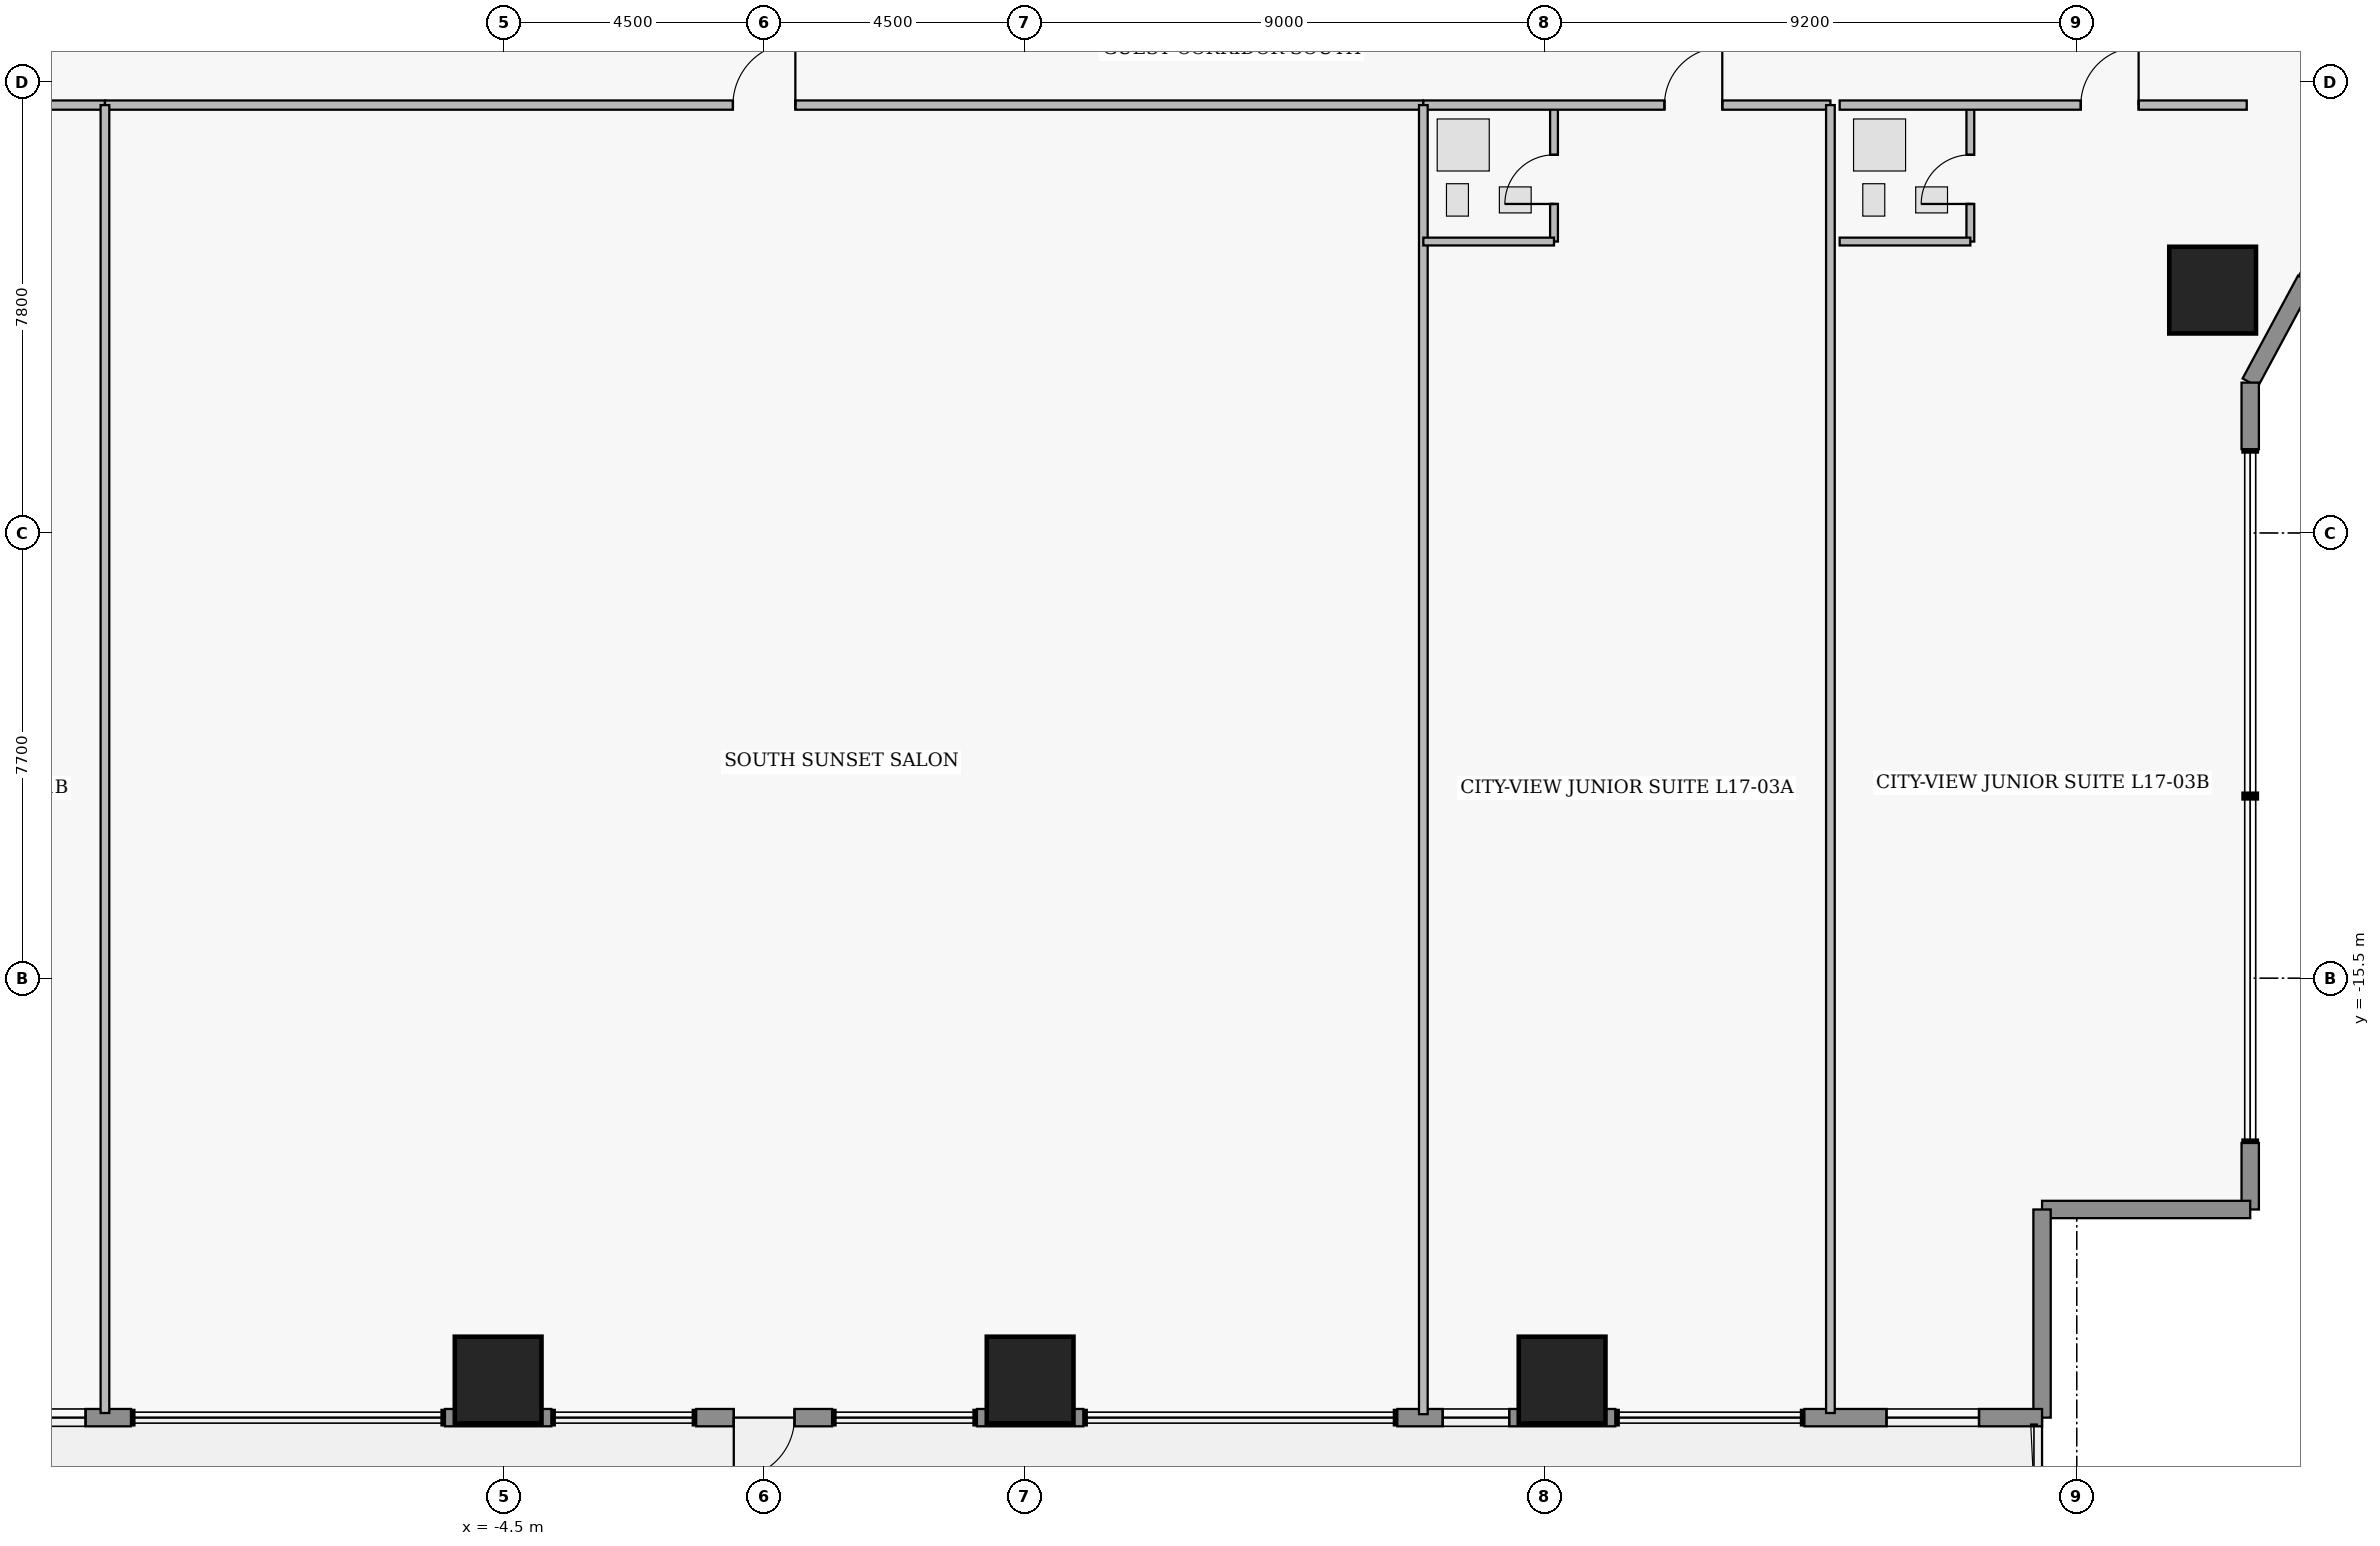
"""IFC4 building model, lengths in metres.
Left out: names, types, materials, properties, quantities, classifications, styles, units other than length and angle.
Written with IfcOpenShell. Run it as: python <this file> out.ifc"""

import sys

from ifc_helpers import new_model, si_unit, direction, frame, frame_2d, origin, origin_2d, place, context, subcontext, project, spatial, rectangle, extrude, element, fill, save


model = new_model("IFC4")
c1 = context("Model", 3, precision=1e-05, world=origin(), true_north=direction((0.0, 1.0)))
c2 = subcontext(c1, "Body", "Model", "MODEL_VIEW")
j1 = project(units=[si_unit("LENGTHUNIT", "METRE"), si_unit("PLANEANGLEUNIT", "RADIAN")], contexts=[c1])
p1 = place(None, origin())
s1 = spatial("IfcSite", under=j1, at=p1, CompositionType="ELEMENT")
p2 = place(p1, origin())
s2 = spatial("IfcBuilding", under=s1, at=p2, CompositionType="ELEMENT")
p3 = place(p2, frame((0.0, 0.0, 71.4)))
s3 = spatial("IfcBuildingStorey", under=s2, at=p3, CompositionType="ELEMENT", Elevation=71.4)
for number, where, z_axis, x_axis in (
    (1, (-4.6, -22.45, 0.0), (0.0, 0.0, 1.0), (1.0, 0.0, 0.0)),
    (2, (4.6, -22.45, 0.0), (0.0, 0.0, 1.0), (1.0, 0.0, 0.0)),
    (3, (13.8, -22.45, 0.0), (0.0, 0.0, 1.0), (1.0, 0.0, 0.0)),
    (4, (25.05, -3.6, 0.0), (0.0, 0.0, 1.0), (1.0, 0.0, 0.0)),
):
    element("IfcColumn", number, at=place(p3, frame(where, z_axis=z_axis, x_axis=x_axis)), inside=s3, PredefinedType="COLUMN", context=c2, shape_type="SweptSolid", body=[
        extrude(rectangle(XDim=1.5, YDim=1.5, at=origin_2d()), origin(), (0.0, 0.0, 1.0), 3.65),
    ])
p4 = place(p3, frame((25.7, 5.2, 0.0), z_axis=(0.0, 0.0, 1.0), x_axis=(0.474109683532, -0.880465790352, 0.0)))
e5 = element("IfcWall", 5, at=p4, inside=s3, PredefinedType="STANDARD", context=c2, shape_type="SweptSolid", body=[
    extrude(rectangle(XDim=5.906, YDim=0.3, at=frame_2d((2.953, 0.0))), origin(), (0.0, 0.0, 1.0), 3.43),
])
p5 = place(p4, frame((2.324, 0.0, 0.95)))
e6 = element("IfcOpeningElement", 6, at=p5, cuts=e5, PredefinedType="OPENING", context=c2, shape_type="SweptSolid", body=[
    extrude(rectangle(XDim=1.15, YDim=1.55, at=frame_2d((0.575, 0.775))), frame((0.0, 0.16, 0.0), z_axis=(0.0, -1.0, 0.0), x_axis=(1.0, 0.0, 0.0)), (0.0, 0.0, 1.0), 0.32),
])
p6 = place(p3, frame((26.658, -3.421, 0.0), z_axis=(0.0, 0.0, 1.0), x_axis=(-0.474121438562, -0.88045946045, 0.0)))
e7 = element("IfcWall", 7, at=p6, inside=s3, PredefinedType="STANDARD", context=c2, shape_type="SweptSolid", body=[
    extrude(rectangle(XDim=2.021, YDim=0.3, at=frame_2d((1.01, 0.0))), origin(), (0.0, 0.0, 1.0), 3.43),
])
p7 = place(p3, frame((25.7, -5.2, 0.0), z_axis=(0.0, 0.0, 1.0), x_axis=(0.0, -1.0, 0.0)))
e8 = element("IfcWall", 8, at=p7, inside=s3, PredefinedType="STANDARD", context=c2, shape_type="SweptSolid", body=[
    extrude(rectangle(XDim=1.15, YDim=0.3, at=frame_2d((0.575, 0.0))), origin(), (0.0, 0.0, 1.0), 3.43),
])
p8 = place(p3, frame((25.7, -18.35, 0.0), z_axis=(0.0, 0.0, 1.0), x_axis=(0.0, -1.0, 0.0)))
e9 = element("IfcWall", 9, at=p8, inside=s3, PredefinedType="STANDARD", context=c2, shape_type="SweptSolid", body=[
    extrude(rectangle(XDim=1.15, YDim=0.3, at=frame_2d((0.575, 0.0))), origin(), (0.0, 0.0, 1.0), 3.43),
])
p9 = place(p3, frame((25.7, -19.5, 0.0), z_axis=(0.0, 0.0, 1.0), x_axis=(-1.0, 0.0, 0.0)))
e10 = element("IfcWall", 10, at=p9, inside=s3, PredefinedType="STANDARD", context=c2, shape_type="SweptSolid", body=[
    extrude(rectangle(XDim=3.6, YDim=0.3, at=frame_2d((1.8, 0.0))), origin(), (0.0, 0.0, 1.0), 3.43),
])
p10 = place(p3, frame((22.1, -19.5, 0.0), z_axis=(0.0, 0.0, 1.0), x_axis=(0.0, -1.0, 0.0)))
e11 = element("IfcWall", 11, at=p10, inside=s3, PredefinedType="STANDARD", context=c2, shape_type="SweptSolid", body=[
    extrude(rectangle(XDim=3.6, YDim=0.3, at=frame_2d((1.8, 0.0))), origin(), (0.0, 0.0, 1.0), 3.43),
])
p11 = place(p3, frame((22.1, -23.1, 0.0), z_axis=(0.0, 0.0, 1.0), x_axis=(-1.0, 0.0, 0.0)))
e12 = element("IfcWall", 12, at=p11, inside=s3, PredefinedType="STANDARD", context=c2, shape_type="SweptSolid", body=[
    extrude(rectangle(XDim=4.11, YDim=0.3, at=frame_2d((2.055, 0.0))), origin(), (0.0, 0.0, 1.0), 3.43),
])
p12 = place(p11, frame((1.09, 0.0, 0.85)))
e13 = element("IfcOpeningElement", 13, at=p12, cuts=e12, PredefinedType="OPENING", context=c2, shape_type="SweptSolid", body=[
    extrude(rectangle(XDim=1.6, YDim=1.8, at=frame_2d((0.8, 0.9))), frame((0.0, 0.16, 0.0), z_axis=(0.0, -1.0, 0.0), x_axis=(1.0, 0.0, 0.0)), (0.0, 0.0, 1.0), 0.32),
])
p13 = place(p3, frame((14.72, -23.1, 0.0), z_axis=(0.0, 0.0, 1.0), x_axis=(-1.0, 0.0, 0.0)))
e14 = element("IfcWall", 14, at=p13, inside=s3, PredefinedType="STANDARD", context=c2, shape_type="SweptSolid", body=[
    extrude(rectangle(XDim=3.77, YDim=0.3, at=frame_2d((1.885, 0.0))), origin(), (0.0, 0.0, 1.0), 3.43),
])
p14 = place(p13, frame((1.835, 0.0, 0.95)))
e15 = element("IfcOpeningElement", 15, at=p14, cuts=e14, PredefinedType="OPENING", context=c2, shape_type="SweptSolid", body=[
    extrude(rectangle(XDim=1.15, YDim=1.55, at=frame_2d((0.575, 0.775))), frame((0.0, 0.16, 0.0), z_axis=(0.0, -1.0, 0.0), x_axis=(1.0, 0.0, 0.0)), (0.0, 0.0, 1.0), 0.32),
])
p15 = place(p3, frame((5.52, -23.1, 0.0), z_axis=(0.0, 0.0, 1.0), x_axis=(-1.0, 0.0, 0.0)))
e16 = element("IfcWall", 16, at=p15, inside=s3, PredefinedType="STANDARD", context=c2, shape_type="SweptSolid", body=[
    extrude(rectangle(XDim=1.84, YDim=0.3, at=frame_2d((0.92, 0.0))), origin(), (0.0, 0.0, 1.0), 3.43),
])
p16 = place(p3, frame((1.175, -23.1, 0.0), z_axis=(0.0, 0.0, 1.0), x_axis=(-1.0, 0.0, 0.0)))
e17 = element("IfcWall", 17, at=p16, inside=s3, PredefinedType="STANDARD", context=c2, shape_type="SweptSolid", body=[
    extrude(rectangle(XDim=2.35, YDim=0.3, at=frame_2d((1.175, 0.0))), origin(), (0.0, 0.0, 1.0), 3.43),
])
p17 = place(p16, frame((0.65, 0.0, 0.0)))
e18 = element("IfcOpeningElement", 18, at=p17, cuts=e17, PredefinedType="OPENING", context=c2, shape_type="SweptSolid", body=[
    extrude(rectangle(XDim=1.05, YDim=2.2, at=frame_2d((0.525, 1.1))), frame((0.0, 0.16, 0.0), z_axis=(0.0, -1.0, 0.0), x_axis=(1.0, 0.0, 0.0)), (0.0, 0.0, 1.0), 0.32),
])
p18 = place(p3, frame((-3.68, -23.1, 0.0), z_axis=(0.0, 0.0, 1.0), x_axis=(-1.0, 0.0, 0.0)))
e19 = element("IfcWall", 19, at=p18, inside=s3, PredefinedType="STANDARD", context=c2, shape_type="SweptSolid", body=[
    extrude(rectangle(XDim=1.84, YDim=0.3, at=frame_2d((0.92, 0.0))), origin(), (0.0, 0.0, 1.0), 3.43),
])
p19 = place(p3, frame((-10.95, -23.1, 0.0), z_axis=(0.0, 0.0, 1.0), x_axis=(-1.0, 0.0, 0.0)))
e20 = element("IfcWall", 20, at=p19, inside=s3, PredefinedType="STANDARD", context=c2, shape_type="SweptSolid", body=[
    extrude(rectangle(XDim=3.77, YDim=0.3, at=frame_2d((1.885, 0.0))), origin(), (0.0, 0.0, 1.0), 3.43),
])
p20 = place(p19, frame((0.785, 0.0, 0.95)))
e21 = element("IfcOpeningElement", 21, at=p20, cuts=e20, PredefinedType="OPENING", context=c2, shape_type="SweptSolid", body=[
    extrude(rectangle(XDim=1.15, YDim=1.55, at=frame_2d((0.575, 0.775))), frame((0.0, 0.16, 0.0), z_axis=(0.0, -1.0, 0.0), x_axis=(1.0, 0.0, 0.0)), (0.0, 0.0, 1.0), 0.32),
])
p21 = place(p3, frame((-18.44, -0.4, 0.0), z_axis=(0.0, 0.0, 1.0), x_axis=(1.0, 0.0, 0.0)))
e22 = element("IfcWall", 22, at=p21, inside=s3, PredefinedType="PARTITIONING", context=c2, shape_type="SweptSolid", body=[
    extrude(rectangle(XDim=7.04, YDim=0.16, at=frame_2d((3.52, 0.0))), origin(), (0.0, 0.0, 1.0), 3.43),
])
p22 = place(p21, frame((4.17, 0.0, 0.0)))
e23 = element("IfcOpeningElement", 23, at=p22, cuts=e22, PredefinedType="OPENING", context=c2, shape_type="SweptSolid", body=[
    extrude(rectangle(XDim=1.0, YDim=2.15, at=frame_2d((0.5, 1.075))), frame((0.0, 0.09, 0.0), z_axis=(0.0, -1.0, 0.0), x_axis=(1.0, 0.0, 0.0)), (0.0, 0.0, 1.0), 0.18),
])
p23 = place(p3, frame((-11.4, -0.4, 0.0), z_axis=(0.0, 0.0, 1.0), x_axis=(1.0, 0.0, 0.0)))
e24 = element("IfcWall", 24, at=p23, inside=s3, PredefinedType="PARTITIONING", context=c2, shape_type="SweptSolid", body=[
    extrude(rectangle(XDim=22.8, YDim=0.16, at=frame_2d((11.4, 0.0))), origin(), (0.0, 0.0, 1.0), 3.43),
])
p24 = place(p23, frame((10.86, 0.0, 0.0)))
e25 = element("IfcOpeningElement", 25, at=p24, cuts=e24, PredefinedType="OPENING", context=c2, shape_type="SweptSolid", body=[
    extrude(rectangle(XDim=1.08, YDim=2.18, at=frame_2d((0.54, 1.09))), frame((0.0, 0.09, 0.0), z_axis=(0.0, -1.0, 0.0), x_axis=(1.0, 0.0, 0.0)), (0.0, 0.0, 1.0), 0.18),
])
p25 = place(p3, frame((13.66, -2.76, 0.0), z_axis=(0.0, 0.0, 1.0), x_axis=(0.0, 1.0, 0.0)))
e26 = element("IfcWall", 26, at=p25, inside=s3, PredefinedType="PLUMBINGWALL", context=c2, shape_type="SweptSolid", body=[
    extrude(rectangle(XDim=2.36, YDim=0.135, at=frame_2d((1.18, 0.0))), origin(), (0.0, 0.0, 1.0), 2.668),
])
p26 = place(p25, frame((0.65, 0.0, 0.0)))
e27 = element("IfcOpeningElement", 27, at=p26, cuts=e26, PredefinedType="OPENING", context=c2, shape_type="SweptSolid", body=[
    extrude(rectangle(XDim=0.85, YDim=2.1, at=frame_2d((0.425, 1.05))), frame((0.0, 0.077, 0.0), z_axis=(0.0, -1.0, 0.0), x_axis=(1.0, 0.0, 0.0)), (0.0, 0.0, 1.0), 0.155),
])
p27 = place(p3, frame((11.4, -0.4, 0.0), z_axis=(0.0, 0.0, 1.0), x_axis=(1.0, 0.0, 0.0)))
e28 = element("IfcWall", 28, at=p27, inside=s3, PredefinedType="PARTITIONING", context=c2, shape_type="SweptSolid", body=[
    extrude(rectangle(XDim=7.04, YDim=0.16, at=frame_2d((3.52, 0.0))), origin(), (0.0, 0.0, 1.0), 3.43),
])
p28 = place(p27, frame((4.17, 0.0, 0.0)))
e29 = element("IfcOpeningElement", 29, at=p28, cuts=e28, PredefinedType="OPENING", context=c2, shape_type="SweptSolid", body=[
    extrude(rectangle(XDim=1.0, YDim=2.15, at=frame_2d((0.5, 1.075))), frame((0.0, 0.09, 0.0), z_axis=(0.0, -1.0, 0.0), x_axis=(1.0, 0.0, 0.0)), (0.0, 0.0, 1.0), 0.18),
])
p29 = place(p3, frame((20.86, -2.76, 0.0), z_axis=(0.0, 0.0, 1.0), x_axis=(0.0, 1.0, 0.0)))
e30 = element("IfcWall", 30, at=p29, inside=s3, PredefinedType="PLUMBINGWALL", context=c2, shape_type="SweptSolid", body=[
    extrude(rectangle(XDim=2.36, YDim=0.135, at=frame_2d((1.18, 0.0))), origin(), (0.0, 0.0, 1.0), 3.43),
])
p30 = place(p29, frame((0.65, 0.0, 0.0)))
e31 = element("IfcOpeningElement", 31, at=p30, cuts=e30, PredefinedType="OPENING", context=c2, shape_type="SweptSolid", body=[
    extrude(rectangle(XDim=0.85, YDim=2.1, at=frame_2d((0.425, 1.05))), frame((0.0, 0.077, 0.0), z_axis=(0.0, -1.0, 0.0), x_axis=(1.0, 0.0, 0.0)), (0.0, 0.0, 1.0), 0.155),
])
p31 = place(p3, frame((18.6, -0.4, 0.0), z_axis=(0.0, 0.0, 1.0), x_axis=(1.0, 0.0, 0.0)))
e32 = element("IfcWall", 32, at=p31, inside=s3, PredefinedType="PARTITIONING", context=c2, shape_type="SweptSolid", body=[
    extrude(rectangle(XDim=7.04, YDim=0.16, at=frame_2d((3.52, 0.0))), origin(), (0.0, 0.0, 1.0), 3.43),
])
p32 = place(p31, frame((4.17, 0.0, 0.0)))
e33 = element("IfcOpeningElement", 33, at=p32, cuts=e32, PredefinedType="OPENING", context=c2, shape_type="SweptSolid", body=[
    extrude(rectangle(XDim=1.0, YDim=2.15, at=frame_2d((0.5, 1.075))), frame((0.0, 0.09, 0.0), z_axis=(0.0, -1.0, 0.0), x_axis=(1.0, 0.0, 0.0)), (0.0, 0.0, 1.0), 0.18),
])
p33 = place(p3, frame((-11.4, -23.02, 0.0), z_axis=(0.0, 0.0, 1.0), x_axis=(0.0, 1.0, 0.0)))
e34 = element("IfcWall", 34, at=p33, inside=s3, PredefinedType="PARTITIONING", context=c2, shape_type="SweptSolid", body=[
    extrude(rectangle(XDim=22.62, YDim=0.15, at=frame_2d((11.31, 0.0))), origin(), (0.0, 0.0, 1.0), 3.43),
])
p34 = place(p3, frame((11.4, -23.04, 0.0), z_axis=(0.0, 0.0, 1.0), x_axis=(0.0, 1.0, 0.0)))
e35 = element("IfcWall", 35, at=p34, inside=s3, PredefinedType="PARTITIONING", context=c2, shape_type="SweptSolid", body=[
    extrude(rectangle(XDim=22.64, YDim=0.15, at=frame_2d((11.32, 0.0))), origin(), (0.0, 0.0, 1.0), 3.43),
])
p35 = place(p3, frame((11.4, -2.76, 0.0), z_axis=(0.0, 0.0, 1.0), x_axis=(1.0, 0.0, 0.0)))
e36 = element("IfcWall", 36, at=p35, inside=s3, PredefinedType="PLUMBINGWALL", context=c2, shape_type="SweptSolid", body=[
    extrude(rectangle(XDim=2.26, YDim=0.135, at=frame_2d((1.13, 0.0))), origin(), (0.0, 0.0, 1.0), 3.43),
])
p36 = place(p3, frame((18.44, -23.02, 0.0), z_axis=(0.0, 0.0, 1.0), x_axis=(0.0, 1.0, 0.0)))
e37 = element("IfcWall", 37, at=p36, inside=s3, PredefinedType="PARTITIONING", context=c2, shape_type="SweptSolid", body=[
    extrude(rectangle(XDim=22.62, YDim=0.15, at=frame_2d((11.31, 0.0))), origin(), (0.0, 0.0, 1.0), 3.43),
])
p37 = place(p3, frame((18.6, -2.76, 0.0), z_axis=(0.0, 0.0, 1.0), x_axis=(1.0, 0.0, 0.0)))
e38 = element("IfcWall", 38, at=p37, inside=s3, PredefinedType="PLUMBINGWALL", context=c2, shape_type="SweptSolid", body=[
    extrude(rectangle(XDim=2.26, YDim=0.135, at=frame_2d((1.13, 0.0))), origin(), (0.0, 0.0, 1.0), 3.43),
])
p38 = place(p12, origin())
e39 = element("IfcWindow", 39, at=p38, inside=s3, PartitioningType="SINGLE_PANEL", PredefinedType="WINDOW", context=c2, shape_type="SweptSolid", body=[
    extrude(rectangle(XDim=1.6, YDim=1.8, at=frame_2d((0.8, 0.9))), frame((0.0, 0.03, 0.0), z_axis=(0.0, -1.0, 0.0), x_axis=(1.0, 0.0, 0.0)), (0.0, 0.0, 1.0), 0.06),
])
fill(e13, e39)
p39 = place(p14, origin())
e40 = element("IfcWindow", 40, at=p39, inside=s3, PartitioningType="SINGLE_PANEL", PredefinedType="WINDOW", context=c2, shape_type="SweptSolid", body=[
    extrude(rectangle(XDim=1.15, YDim=1.55, at=frame_2d((0.575, 0.775))), frame((0.0, 0.03, 0.0), z_axis=(0.0, -1.0, 0.0), x_axis=(1.0, 0.0, 0.0)), (0.0, 0.0, 1.0), 0.06),
])
fill(e15, e40)
p40 = place(p17, origin())
e41 = element("IfcDoor", 41, at=p40, inside=s3, OperationType="SINGLE_SWING_RIGHT", PredefinedType="DOOR", context=c2, shape_type="SweptSolid", body=[
    extrude(rectangle(XDim=1.05, YDim=2.2, at=frame_2d((0.525, 1.1))), frame((0.0, 0.025, 0.0), z_axis=(0.0, -1.0, 0.0), x_axis=(1.0, 0.0, 0.0)), (0.0, 0.0, 1.0), 0.05),
])
fill(e18, e41)
p41 = place(p20, origin())
e42 = element("IfcWindow", 42, at=p41, inside=s3, PartitioningType="SINGLE_PANEL", PredefinedType="WINDOW", context=c2, shape_type="SweptSolid", body=[
    extrude(rectangle(XDim=1.15, YDim=1.55, at=frame_2d((0.575, 0.775))), frame((0.0, 0.03, 0.0), z_axis=(0.0, -1.0, 0.0), x_axis=(1.0, 0.0, 0.0)), (0.0, 0.0, 1.0), 0.06),
])
fill(e21, e42)
p42 = place(p24, origin())
e43 = element("IfcDoor", 43, at=p42, inside=s3, OperationType="SINGLE_SWING_RIGHT", PredefinedType="DOOR", context=c2, shape_type="SweptSolid", body=[
    extrude(rectangle(XDim=1.08, YDim=2.18, at=frame_2d((0.54, 1.09))), frame((0.0, 0.025, 0.0), z_axis=(0.0, -1.0, 0.0), x_axis=(1.0, 0.0, 0.0)), (0.0, 0.0, 1.0), 0.05),
])
fill(e25, e43)
p43 = place(p26, origin())
e44 = element("IfcDoor", 44, at=p43, inside=s3, OperationType="SINGLE_SWING_LEFT", PredefinedType="DOOR", context=c2, shape_type="SweptSolid", body=[
    extrude(rectangle(XDim=0.85, YDim=2.1, at=frame_2d((0.425, 1.05))), frame((0.0, 0.025, 0.0), z_axis=(0.0, -1.0, 0.0), x_axis=(1.0, 0.0, 0.0)), (0.0, 0.0, 1.0), 0.05),
])
fill(e27, e44)
p44 = place(p28, origin())
e45 = element("IfcDoor", 45, at=p44, inside=s3, OperationType="SINGLE_SWING_RIGHT", PredefinedType="DOOR", context=c2, shape_type="SweptSolid", body=[
    extrude(rectangle(XDim=1.0, YDim=2.15, at=frame_2d((0.5, 1.075))), frame((0.0, 0.025, 0.0), z_axis=(0.0, -1.0, 0.0), x_axis=(1.0, 0.0, 0.0)), (0.0, 0.0, 1.0), 0.05),
])
fill(e29, e45)
p45 = place(p30, origin())
e46 = element("IfcDoor", 46, at=p45, inside=s3, OperationType="SINGLE_SWING_LEFT", PredefinedType="DOOR", context=c2, shape_type="SweptSolid", body=[
    extrude(rectangle(XDim=0.85, YDim=2.1, at=frame_2d((0.425, 1.05))), frame((0.0, 0.025, 0.0), z_axis=(0.0, -1.0, 0.0), x_axis=(1.0, 0.0, 0.0)), (0.0, 0.0, 1.0), 0.05),
])
fill(e31, e46)
p46 = place(p32, origin())
e47 = element("IfcDoor", 47, at=p46, inside=s3, OperationType="SINGLE_SWING_RIGHT", PredefinedType="DOOR", context=c2, shape_type="SweptSolid", body=[
    extrude(rectangle(XDim=1.0, YDim=2.15, at=frame_2d((0.5, 1.075))), frame((0.0, 0.025, 0.0), z_axis=(0.0, -1.0, 0.0), x_axis=(1.0, 0.0, 0.0)), (0.0, 0.0, 1.0), 0.05),
])
fill(e33, e47)
save(model, sys.argv[1])
